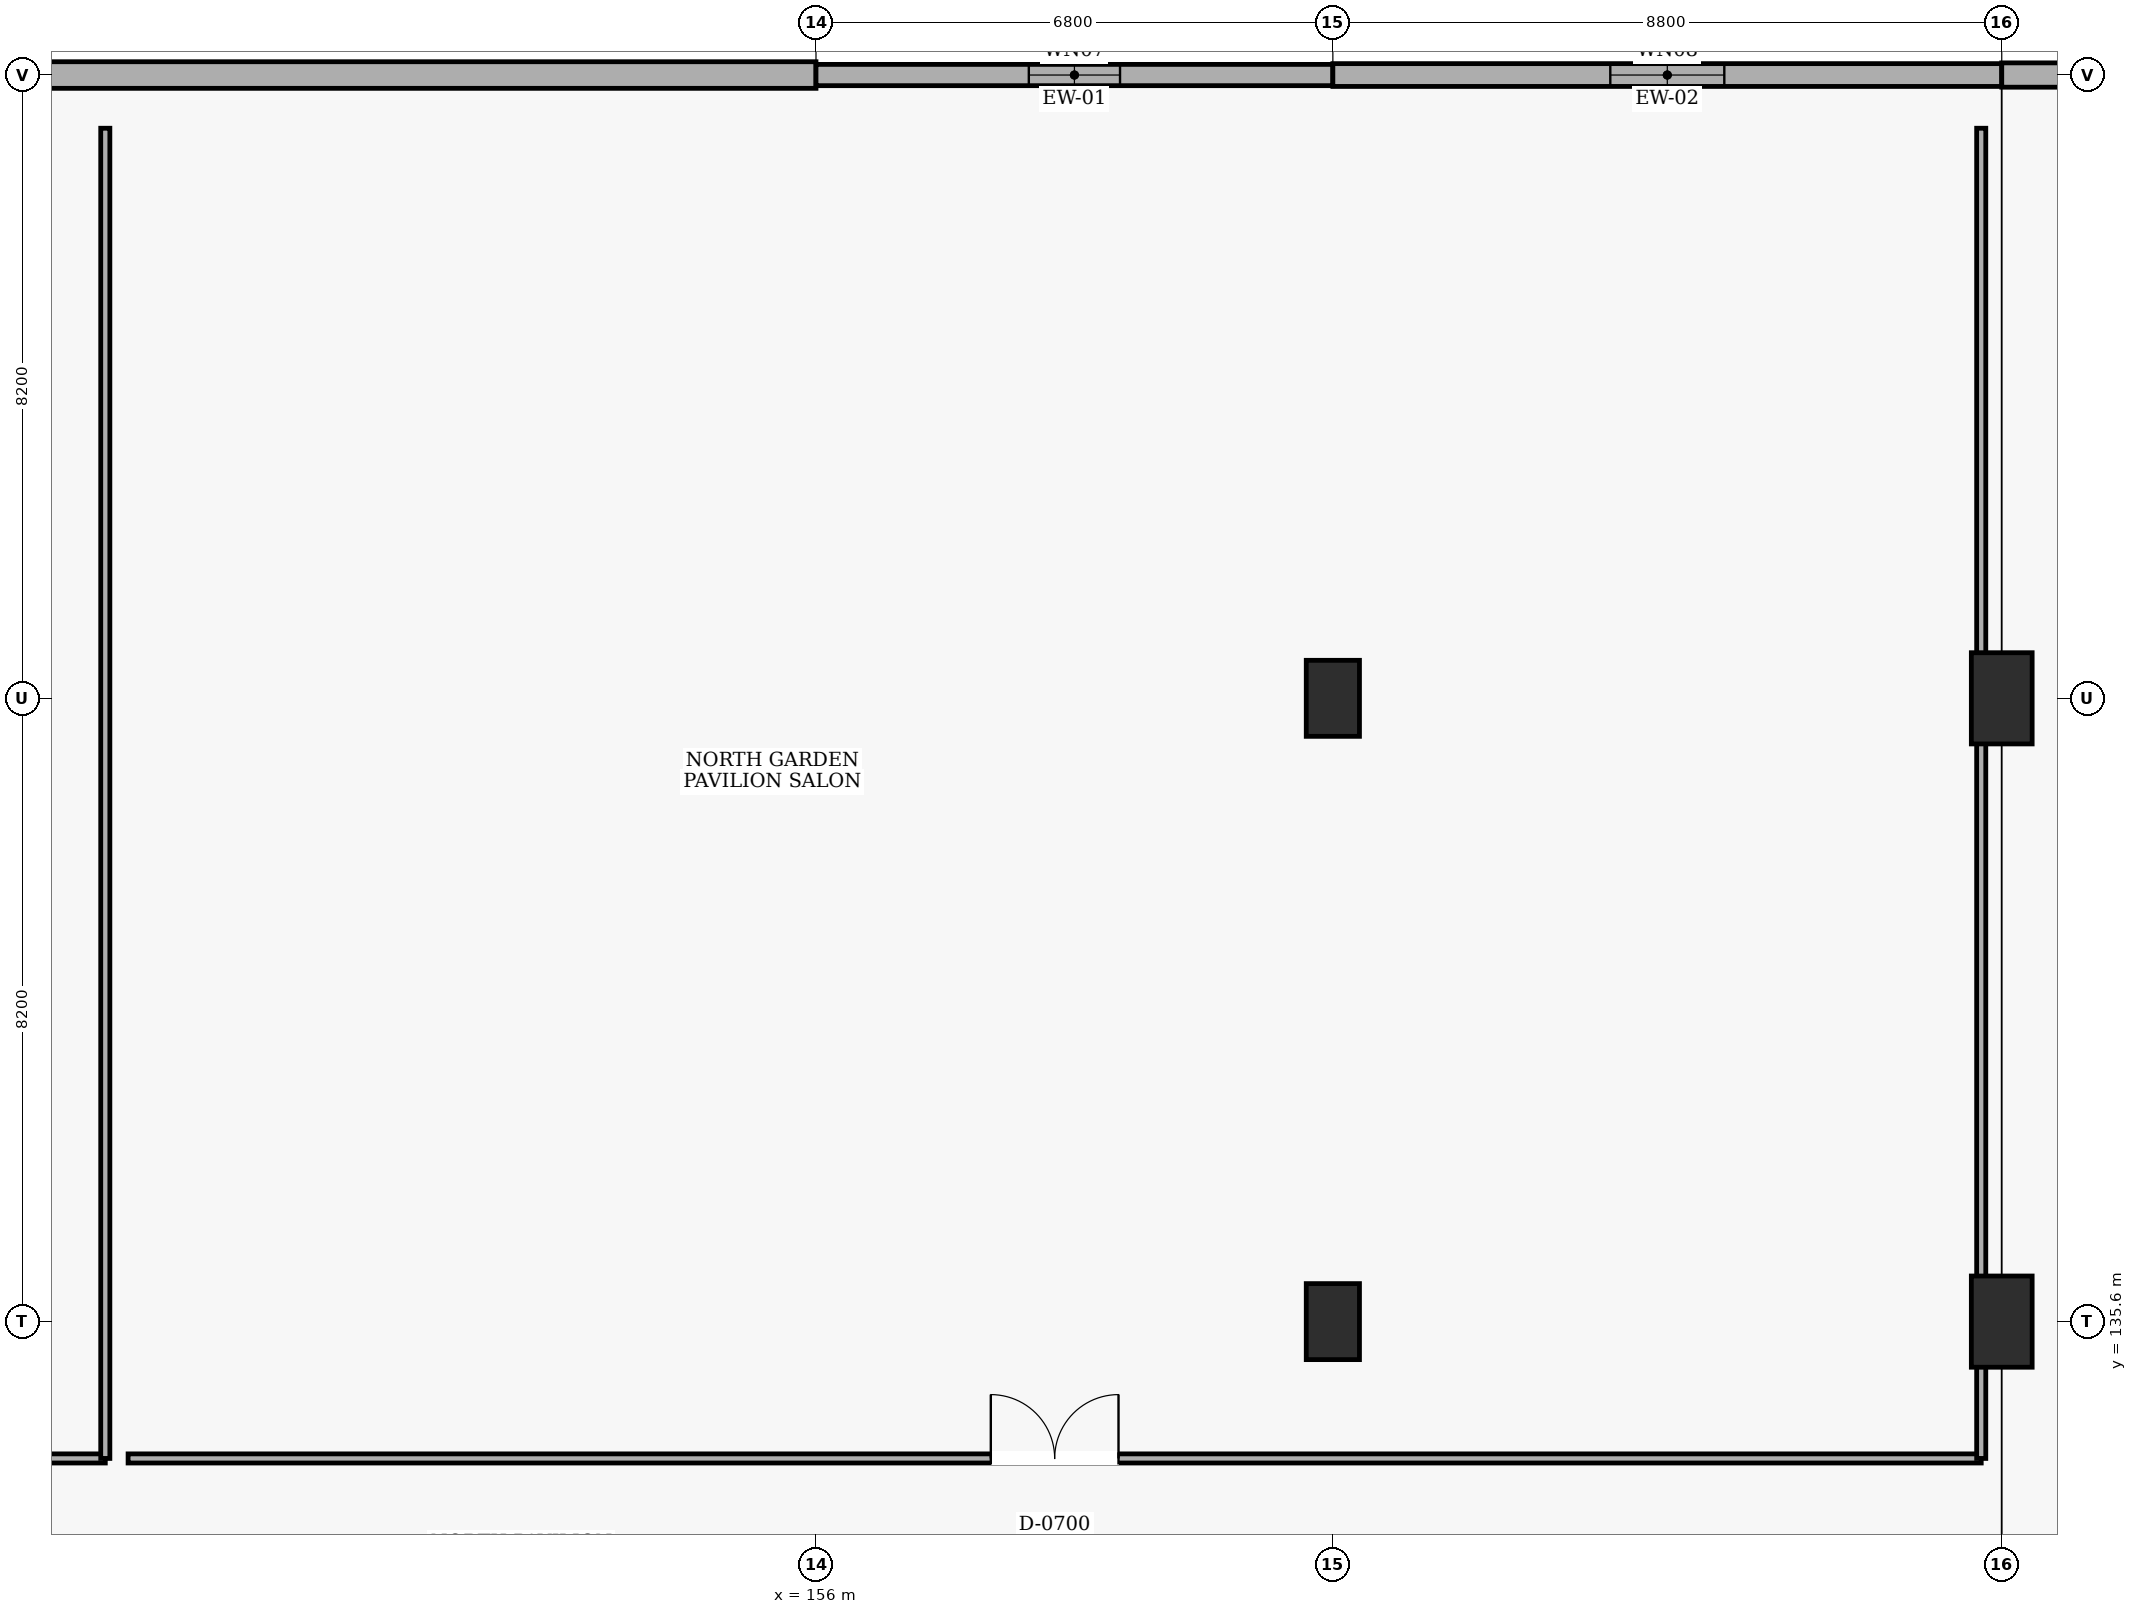
"""IFC4 building model, lengths in metres.
Left out: names, types, materials, properties, quantities, classifications, styles, units other than length and angle.
Written with IfcOpenShell. Run it as: python <this file> out.ifc"""

import sys

from ifc_helpers import new_model, si_unit, direction, frame, frame_2d, origin, origin_2d, place, context, subcontext, project, spatial, rectangle, extrude, element, fill, save


model = new_model("IFC4")
c1 = context("Model", 3, precision=1e-05, world=origin(), true_north=direction((0.0, 1.0)))
c2 = subcontext(c1, "Body", "Model", "MODEL_VIEW")
j1 = project(units=[si_unit("LENGTHUNIT", "METRE"), si_unit("PLANEANGLEUNIT", "RADIAN")], contexts=[c1])
p1 = place(None, origin())
s1 = spatial("IfcSite", under=j1, at=p1, CompositionType="ELEMENT")
p2 = place(p1, origin())
s2 = spatial("IfcBuilding", under=s1, at=p2, CompositionType="ELEMENT")
p3 = place(p2, frame((0.0, 0.0, 15.0)))
s3 = spatial("IfcBuildingStorey", under=s2, at=p3, CompositionType="ELEMENT", Elevation=15.0)
for number, where, z_axis, x_axis in (
    (1, (162.8, 135.6, 0.0), (0.0, 0.0, 1.0), (1.0, 0.0, 0.0)),
    (2, (162.8, 143.8, 0.0), (0.0, 0.0, 1.0), (1.0, 0.0, 0.0)),
):
    element("IfcColumn", number, at=place(p3, frame(where, z_axis=z_axis, x_axis=x_axis)), inside=s3, PredefinedType="COLUMN", context=c2, shape_type="SweptSolid", body=[
        extrude(rectangle(XDim=0.7, YDim=1.0, at=origin_2d()), origin(), (0.0, 0.0, 1.0), 4.8),
    ])
for number, where, z_axis, x_axis in (
    (3, (171.6, 135.6, 0.0), (0.0, 0.0, 1.0), (1.0, 0.0, 0.0)),
    (4, (171.6, 143.8, 0.0), (0.0, 0.0, 1.0), (1.0, 0.0, 0.0)),
):
    element("IfcColumn", number, at=place(p3, frame(where, z_axis=z_axis, x_axis=x_axis)), inside=s3, PredefinedType="COLUMN", context=c2, shape_type="SweptSolid", body=[
        extrude(rectangle(XDim=0.8, YDim=1.2, at=origin_2d()), origin(), (0.0, 0.0, 1.0), 4.8),
    ])
p4 = place(p3, frame((122.0, 152.0, 0.0), z_axis=(0.0, 0.0, 1.0), x_axis=(1.0, 0.0, 0.0)))
e5 = element("IfcWall", 5, at=p4, inside=s3, PredefinedType="SOLIDWALL", context=c2, shape_type="SweptSolid", body=[
    extrude(rectangle(XDim=34.0, YDim=0.35, at=frame_2d((17.0, 0.0))), origin(), (0.0, 0.0, 1.0), 4.48),
])
p5 = place(p4, frame((15.9, 0.0, 0.9)))
e6 = element("IfcOpeningElement", 6, at=p5, cuts=e5, PredefinedType="OPENING", context=c2, shape_type="SweptSolid", body=[
    extrude(rectangle(XDim=2.2, YDim=1.5, at=frame_2d((1.1, 0.75))), frame((0.0, 0.185, 0.0), z_axis=(0.0, -1.0, 0.0), x_axis=(1.0, 0.0, 0.0)), (0.0, 0.0, 1.0), 0.37),
])
p6 = place(p3, frame((156.0, 152.0, 0.0), z_axis=(0.0, 0.0, 1.0), x_axis=(1.0, 0.0, 0.0)))
e7 = element("IfcWall", 7, at=p6, inside=s3, PredefinedType="SOLIDWALL", context=c2, shape_type="SweptSolid", body=[
    extrude(rectangle(XDim=6.8, YDim=0.28, at=frame_2d((3.4, 0.0))), origin(), (0.0, 0.0, 1.0), 4.48),
])
p7 = place(p6, frame((2.8, 0.0, 0.9)))
e8 = element("IfcOpeningElement", 8, at=p7, cuts=e7, PredefinedType="OPENING", context=c2, shape_type="SweptSolid", body=[
    extrude(rectangle(XDim=1.2, YDim=1.8, at=frame_2d((0.6, 0.9))), frame((0.0, 0.15, 0.0), z_axis=(0.0, -1.0, 0.0), x_axis=(1.0, 0.0, 0.0)), (0.0, 0.0, 1.0), 0.3),
])
p8 = place(p3, frame((162.8, 152.0, 0.0), z_axis=(0.0, 0.0, 1.0), x_axis=(1.0, 0.0, 0.0)))
e9 = element("IfcWall", 9, at=p8, inside=s3, PredefinedType="SOLIDWALL", context=c2, shape_type="SweptSolid", body=[
    extrude(rectangle(XDim=8.8, YDim=0.3, at=frame_2d((4.4, 0.0))), origin(), (0.0, 0.0, 1.0), 4.48),
])
p9 = place(p8, frame((3.65, 0.0, 0.9)))
e10 = element("IfcOpeningElement", 10, at=p9, cuts=e9, PredefinedType="OPENING", context=c2, shape_type="SweptSolid", body=[
    extrude(rectangle(XDim=1.5, YDim=1.8, at=frame_2d((0.75, 0.9))), frame((0.0, 0.16, 0.0), z_axis=(0.0, -1.0, 0.0), x_axis=(1.0, 0.0, 0.0)), (0.0, 0.0, 1.0), 0.32),
])
p10 = place(p3, frame((171.6, 152.0, 0.0), z_axis=(0.0, 0.0, 1.0), x_axis=(1.0, 0.0, 0.0)))
e11 = element("IfcWall", 11, at=p10, inside=s3, PredefinedType="SOLIDWALL", context=c2, shape_type="SweptSolid", body=[
    extrude(rectangle(XDim=8.8, YDim=0.32, at=frame_2d((4.4, 0.0))), origin(), (0.0, 0.0, 1.0), 4.48),
])
p11 = place(p10, frame((3.5, 0.0, 0.9)))
e12 = element("IfcOpeningElement", 12, at=p11, cuts=e11, PredefinedType="OPENING", context=c2, shape_type="SweptSolid", body=[
    extrude(rectangle(XDim=1.8, YDim=1.8, at=frame_2d((0.9, 0.9))), frame((0.0, 0.17, 0.0), z_axis=(0.0, -1.0, 0.0), x_axis=(1.0, 0.0, 0.0)), (0.0, 0.0, 1.0), 0.34),
])
p12 = place(p3, frame((122.27, 133.8, 0.0), z_axis=(0.0, 0.0, 1.0), x_axis=(1.0, 0.0, 0.0)))
e13 = element("IfcWall", 13, at=p12, inside=s3, PredefinedType="PARTITIONING", context=c2, shape_type="SweptSolid", body=[
    extrude(rectangle(XDim=24.38, YDim=0.12, at=frame_2d((12.19, 0.0))), origin(), (0.0, 0.0, 1.0), 4.5),
])
p13 = place(p12, frame((11.415, 0.0, 0.0)))
e14 = element("IfcOpeningElement", 14, at=p13, cuts=e13, PredefinedType="OPENING", context=c2, shape_type="SweptSolid", body=[
    extrude(rectangle(XDim=1.55, YDim=2.2, at=frame_2d((0.775, 1.1))), frame((0.0, 0.07, 0.0), z_axis=(0.0, -1.0, 0.0), x_axis=(1.0, 0.0, 0.0)), (0.0, 0.0, 1.0), 0.14),
])
p14 = place(p3, frame((146.65, 133.8, 0.0), z_axis=(0.0, 0.0, 1.0), x_axis=(0.0, 1.0, 0.0)))
e15 = element("IfcWall", 15, at=p14, inside=s3, PredefinedType="PARTITIONING", context=c2, shape_type="SweptSolid", body=[
    extrude(rectangle(XDim=17.5, YDim=0.12, at=frame_2d((8.75, 0.0))), origin(), (0.0, 0.0, 1.0), 4.5),
])
p15 = place(p3, frame((146.95, 133.8, 0.0), z_axis=(0.0, 0.0, 1.0), x_axis=(1.0, 0.0, 0.0)))
e16 = element("IfcWall", 16, at=p15, inside=s3, PredefinedType="PARTITIONING", context=c2, shape_type="SweptSolid", body=[
    extrude(rectangle(XDim=24.38, YDim=0.12, at=frame_2d((12.19, 0.0))), origin(), (0.0, 0.0, 1.0), 4.5),
])
p16 = place(p15, frame((11.35, 0.0, 0.0)))
e17 = element("IfcOpeningElement", 17, at=p16, cuts=e16, PredefinedType="OPENING", context=c2, shape_type="SweptSolid", body=[
    extrude(rectangle(XDim=1.68, YDim=2.25, at=frame_2d((0.84, 1.125))), frame((0.0, 0.07, 0.0), z_axis=(0.0, -1.0, 0.0), x_axis=(1.0, 0.0, 0.0)), (0.0, 0.0, 1.0), 0.14),
])
p17 = place(p3, frame((171.33, 133.8, 0.0), z_axis=(0.0, 0.0, 1.0), x_axis=(0.0, 1.0, 0.0)))
e18 = element("IfcWall", 18, at=p17, inside=s3, PredefinedType="PARTITIONING", context=c2, shape_type="SweptSolid", body=[
    extrude(rectangle(XDim=17.5, YDim=0.12, at=frame_2d((8.75, 0.0))), origin(), (0.0, 0.0, 1.0), 3.78),
])
p18 = place(p7, origin())
e19 = element("IfcWindow", 19, at=p18, inside=s3, PartitioningType="SINGLE_PANEL", PredefinedType="WINDOW", context=c2, shape_type="SweptSolid", body=[
    extrude(rectangle(XDim=1.2, YDim=1.8, at=frame_2d((0.6, 0.9))), frame((0.0, 0.03, 0.0), z_axis=(0.0, -1.0, 0.0), x_axis=(1.0, 0.0, 0.0)), (0.0, 0.0, 1.0), 0.06),
])
fill(e8, e19)
p19 = place(p9, origin())
e20 = element("IfcWindow", 20, at=p19, inside=s3, PartitioningType="SINGLE_PANEL", PredefinedType="WINDOW", context=c2, shape_type="SweptSolid", body=[
    extrude(rectangle(XDim=1.5, YDim=1.8, at=frame_2d((0.75, 0.9))), frame((0.0, 0.03, 0.0), z_axis=(0.0, -1.0, 0.0), x_axis=(1.0, 0.0, 0.0)), (0.0, 0.0, 1.0), 0.06),
])
fill(e10, e20)
p20 = place(p16, origin())
e21 = element("IfcDoor", 21, at=p20, inside=s3, OperationType="DOUBLE_DOOR_SINGLE_SWING", PredefinedType="DOOR", context=c2, shape_type="SweptSolid", body=[
    extrude(rectangle(XDim=1.68, YDim=2.25, at=frame_2d((0.84, 1.125))), frame((0.0, 0.025, 0.0), z_axis=(0.0, -1.0, 0.0), x_axis=(1.0, 0.0, 0.0)), (0.0, 0.0, 1.0), 0.05),
])
fill(e17, e21)
save(model, sys.argv[1])
